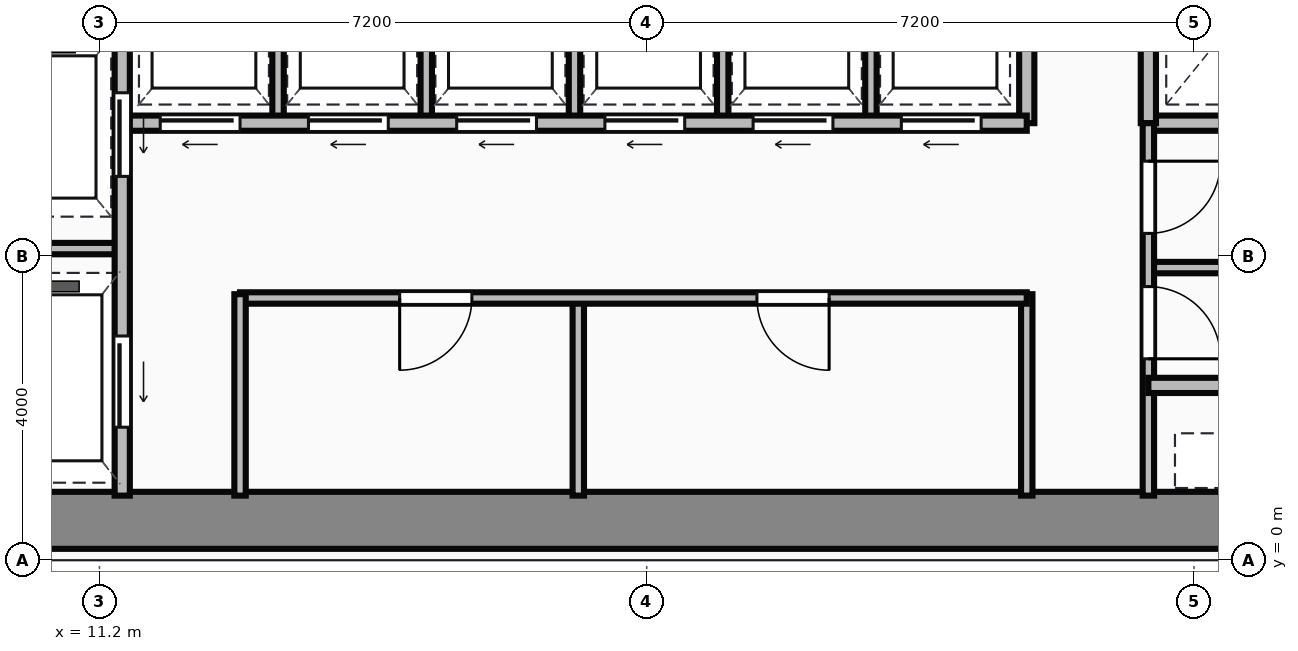
"""IFC4 building model, lengths in metres.
Left out: names, types, materials, properties, quantities, classifications, styles, units other than length and angle.
Written with IfcOpenShell. Run it as: python <this file> out.ifc"""

import sys

from ifc_helpers import new_model, si_unit, direction, frame, frame_2d, origin, place, context, subcontext, project, spatial, rectangle, extrude, source, transform, mapped, element, fill, save


model = new_model("IFC4")
c1 = context("Model", 3, precision=1e-05, world=origin(), true_north=direction((0.0, 1.0)))
c2 = subcontext(c1, "Body", "Model", "MODEL_VIEW")
j1 = project(units=[si_unit("LENGTHUNIT", "METRE"), si_unit("PLANEANGLEUNIT", "RADIAN")], contexts=[c1])
p1 = place(None, origin())
s1 = spatial("IfcSite", under=j1, at=p1, CompositionType="ELEMENT")
p2 = place(p1, origin())
s2 = spatial("IfcBuilding", under=s1, at=p2, CompositionType="ELEMENT")
p3 = place(p2, frame((0.0, 0.0, 173.45)))
s3 = spatial("IfcBuildingStorey", under=s2, at=p3, CompositionType="ELEMENT", Elevation=173.45)
m1 = source(origin(), c2, "Body", "SweptSolid", [
    extrude(rectangle(XDim=29.5, YDim=0.75, at=frame_2d((14.75, 0.0))), origin(), (0.0, 0.0, 1.0), 3.65),
])
p4 = place(p3, frame((4.5, 0.525, 0.0), z_axis=(0.0, 0.0, 1.0), x_axis=(1.0, 0.0, 0.0)))
e1 = element("IfcWall", 1, at=p4, inside=s3, PredefinedType="SHEAR", context=c2, shape_type="MappedRepresentation", body=[
    mapped(m1, transform((0.0, 0.0, 0.0))),
])
m2 = source(origin(), c2, "Body", "SweptSolid", [
    extrude(rectangle(XDim=9.6, YDim=0.2, at=frame_2d((4.8, 0.0))), origin(), (0.0, 0.0, 1.0), 3.4),
])
p5 = place(p3, frame((11.5, 0.85, 0.0), z_axis=(0.0, 0.0, 1.0), x_axis=(0.0, 1.0, 0.0)))
e2 = element("IfcWall", 2, at=p5, inside=s3, PredefinedType="PARTITIONING", context=c2, shape_type="MappedRepresentation", body=[
    mapped(m2, transform((0.0, 0.0, 0.0))),
])
p6 = place(p5, frame((4.2, 0.0, 0.0)))
e3 = element("IfcOpeningElement", 3, at=p6, cuts=e2, PredefinedType="OPENING", context=c2, shape_type="SweptSolid", body=[
    extrude(rectangle(XDim=1.1, YDim=2.15, at=frame_2d((0.55, 1.075))), frame((0.0, 0.11, 0.0), z_axis=(0.0, -1.0, 0.0), x_axis=(1.0, 0.0, 0.0)), (0.0, 0.0, 1.0), 0.22),
])
p7 = place(p5, frame((0.9, 0.0, 0.0)))
e4 = element("IfcOpeningElement", 4, at=p7, cuts=e2, PredefinedType="OPENING", context=c2, shape_type="SweptSolid", body=[
    extrude(rectangle(XDim=1.2, YDim=2.15, at=frame_2d((0.6, 1.075))), frame((0.0, 0.11, 0.0), z_axis=(0.0, -1.0, 0.0), x_axis=(1.0, 0.0, 0.0)), (0.0, 0.0, 1.0), 0.22),
])
m3 = source(origin(), c2, "Body", "SweptSolid", [
    extrude(rectangle(XDim=2.4, YDim=0.15, at=frame_2d((1.2, 0.0))), origin(), (0.0, 0.0, 1.0), 3.4),
])
p8 = place(p3, frame((9.1, 4.1, 0.0), z_axis=(0.0, 0.0, 1.0), x_axis=(1.0, 0.0, 0.0)))
e5 = element("IfcWall", 5, at=p8, inside=s3, PredefinedType="PARTITIONING", context=c2, shape_type="MappedRepresentation", body=[
    mapped(m3, transform((0.0, 0.0, 0.0))),
])
m4 = source(origin(), c2, "Body", "SweptSolid", [
    extrude(rectangle(XDim=2.65, YDim=0.15, at=frame_2d((1.325, 0.0))), origin(), (0.0, 0.0, 1.0), 3.4),
])
p9 = place(p3, frame((13.05, 0.85, 0.0), z_axis=(0.0, 0.0, 1.0), x_axis=(0.0, 1.0, 0.0)))
e6 = element("IfcWall", 6, at=p9, inside=s3, PredefinedType="PARTITIONING", context=c2, shape_type="MappedRepresentation", body=[
    mapped(m4, transform((0.0, 0.0, 0.0))),
])
m5 = source(origin(), c2, "Body", "SweptSolid", [
    extrude(rectangle(XDim=10.35, YDim=0.15, at=frame_2d((5.175, 0.0))), origin(), (0.0, 0.0, 1.0), 3.4),
])
p10 = place(p3, frame((13.05, 3.45, 0.0), z_axis=(0.0, 0.0, 1.0), x_axis=(1.0, 0.0, 0.0)))
e7 = element("IfcWall", 7, at=p10, inside=s3, PredefinedType="PARTITIONING", context=c2, shape_type="MappedRepresentation", body=[
    mapped(m5, transform((0.0, 0.0, 0.0))),
])
p11 = place(p10, frame((2.1, 0.0, 0.0)))
e8 = element("IfcOpeningElement", 8, at=p11, cuts=e7, PredefinedType="OPENING", context=c2, shape_type="SweptSolid", body=[
    extrude(rectangle(XDim=0.95, YDim=2.15, at=frame_2d((0.475, 1.075))), frame((0.0, 0.085, 0.0), z_axis=(0.0, -1.0, 0.0), x_axis=(1.0, 0.0, 0.0)), (0.0, 0.0, 1.0), 0.17),
])
p12 = place(p10, frame((6.8, 0.0, 0.0)))
e9 = element("IfcOpeningElement", 9, at=p12, cuts=e7, PredefinedType="OPENING", context=c2, shape_type="SweptSolid", body=[
    extrude(rectangle(XDim=0.95, YDim=2.15, at=frame_2d((0.475, 1.075))), frame((0.0, 0.085, 0.0), z_axis=(0.0, -1.0, 0.0), x_axis=(1.0, 0.0, 0.0)), (0.0, 0.0, 1.0), 0.17),
])
p13 = place(p3, frame((23.4, 0.85, 0.0), z_axis=(0.0, 0.0, 1.0), x_axis=(0.0, 1.0, 0.0)))
e10 = element("IfcWall", 10, at=p13, inside=s3, PredefinedType="PARTITIONING", context=c2, shape_type="MappedRepresentation", body=[
    mapped(m4, transform((0.0, 0.0, 0.0))),
])
m6 = source(origin(), c2, "Body", "SweptSolid", [
    extrude(rectangle(XDim=2.6, YDim=0.15, at=frame_2d((1.3, 0.0))), origin(), (0.0, 0.0, 1.0), 3.4),
])
p14 = place(p3, frame((17.5, 0.85, 0.0), z_axis=(0.0, 0.0, 1.0), x_axis=(0.0, 1.0, 0.0)))
e11 = element("IfcWall", 11, at=p14, inside=s3, PredefinedType="PARTITIONING", context=c2, shape_type="MappedRepresentation", body=[
    mapped(m6, transform((0.0, 0.0, 0.0))),
])
m7 = source(origin(), c2, "Body", "SweptSolid", [
    extrude(rectangle(XDim=11.85, YDim=0.2, at=frame_2d((5.925, 0.0))), origin(), (0.0, 0.0, 1.0), 3.4),
])
p15 = place(p3, frame((11.55, 5.75, 0.0), z_axis=(0.0, 0.0, 1.0), x_axis=(1.0, 0.0, 0.0)))
e12 = element("IfcWall", 12, at=p15, inside=s3, PredefinedType="PARTITIONING", context=c2, shape_type="MappedRepresentation", body=[
    mapped(m7, transform((0.0, 0.0, 0.0))),
])
p16 = place(p15, frame((0.45, 0.0, 0.0)))
e13 = element("IfcOpeningElement", 13, at=p16, cuts=e12, PredefinedType="OPENING", context=c2, shape_type="SweptSolid", body=[
    extrude(rectangle(XDim=1.05, YDim=2.15, at=frame_2d((0.525, 1.075))), frame((0.0, 0.11, 0.0), z_axis=(0.0, -1.0, 0.0), x_axis=(1.0, 0.0, 0.0)), (0.0, 0.0, 1.0), 0.22),
])
p17 = place(p15, frame((2.4, 0.0, 0.0)))
e14 = element("IfcOpeningElement", 14, at=p17, cuts=e12, PredefinedType="OPENING", context=c2, shape_type="SweptSolid", body=[
    extrude(rectangle(XDim=1.05, YDim=2.15, at=frame_2d((0.525, 1.075))), frame((0.0, 0.11, 0.0), z_axis=(0.0, -1.0, 0.0), x_axis=(1.0, 0.0, 0.0)), (0.0, 0.0, 1.0), 0.22),
])
p18 = place(p15, frame((4.35, 0.0, 0.0)))
e15 = element("IfcOpeningElement", 15, at=p18, cuts=e12, PredefinedType="OPENING", context=c2, shape_type="SweptSolid", body=[
    extrude(rectangle(XDim=1.05, YDim=2.15, at=frame_2d((0.525, 1.075))), frame((0.0, 0.11, 0.0), z_axis=(0.0, -1.0, 0.0), x_axis=(1.0, 0.0, 0.0)), (0.0, 0.0, 1.0), 0.22),
])
p19 = place(p15, frame((6.3, 0.0, 0.0)))
e16 = element("IfcOpeningElement", 16, at=p19, cuts=e12, PredefinedType="OPENING", context=c2, shape_type="SweptSolid", body=[
    extrude(rectangle(XDim=1.05, YDim=2.15, at=frame_2d((0.525, 1.075))), frame((0.0, 0.11, 0.0), z_axis=(0.0, -1.0, 0.0), x_axis=(1.0, 0.0, 0.0)), (0.0, 0.0, 1.0), 0.22),
])
p20 = place(p15, frame((8.25, 0.0, 0.0)))
e17 = element("IfcOpeningElement", 17, at=p20, cuts=e12, PredefinedType="OPENING", context=c2, shape_type="SweptSolid", body=[
    extrude(rectangle(XDim=1.05, YDim=2.15, at=frame_2d((0.525, 1.075))), frame((0.0, 0.11, 0.0), z_axis=(0.0, -1.0, 0.0), x_axis=(1.0, 0.0, 0.0)), (0.0, 0.0, 1.0), 0.22),
])
p21 = place(p15, frame((10.2, 0.0, 0.0)))
e18 = element("IfcOpeningElement", 18, at=p21, cuts=e12, PredefinedType="OPENING", context=c2, shape_type="SweptSolid", body=[
    extrude(rectangle(XDim=1.05, YDim=2.15, at=frame_2d((0.525, 1.075))), frame((0.0, 0.11, 0.0), z_axis=(0.0, -1.0, 0.0), x_axis=(1.0, 0.0, 0.0)), (0.0, 0.0, 1.0), 0.22),
])
m8 = source(origin(), c2, "Body", "SweptSolid", [
    extrude(rectangle(XDim=2.6, YDim=0.2, at=frame_2d((1.3, 0.0))), origin(), (0.0, 0.0, 1.0), 3.4),
])
p22 = place(p3, frame((23.4, 5.75, 0.0), z_axis=(0.0, 0.0, 1.0), x_axis=(0.0, 1.0, 0.0)))
e19 = element("IfcWall", 19, at=p22, inside=s3, PredefinedType="PARTITIONING", context=c2, shape_type="MappedRepresentation", body=[
    mapped(m8, transform((0.0, 0.0, 0.0))),
])
m9 = source(origin(), c2, "Body", "SweptSolid", [
    extrude(rectangle(XDim=2.5, YDim=0.15, at=frame_2d((1.25, 0.0))), origin(), (0.0, 0.0, 1.0), 3.4),
])
for number, where, z_axis, x_axis in (
    (20, (13.55, 5.8, 0.0), (0.0, 0.0, 1.0), (0.0, 1.0, 0.0)),
    (21, (15.5, 5.8, 0.0), (0.0, 0.0, 1.0), (0.0, 1.0, 0.0)),
    (22, (17.45, 5.8, 0.0), (0.0, 0.0, 1.0), (0.0, 1.0, 0.0)),
    (23, (19.4, 5.8, 0.0), (0.0, 0.0, 1.0), (0.0, 1.0, 0.0)),
    (24, (21.35, 5.8, 0.0), (0.0, 0.0, 1.0), (0.0, 1.0, 0.0)),
):
    element("IfcWall", number, at=place(p3, frame(where, z_axis=z_axis, x_axis=x_axis)), inside=s3, PredefinedType="PARTITIONING", context=c2, shape_type="MappedRepresentation", body=[
        mapped(m9, transform((0.0, 0.0, 0.0))),
    ])
m10 = source(origin(), c2, "Body", "SweptSolid", [
    extrude(rectangle(XDim=4.55, YDim=0.2, at=frame_2d((2.275, 0.0))), origin(), (0.0, 0.0, 1.0), 3.4),
])
p23 = place(p3, frame((25.0, 5.75, 0.0), z_axis=(0.0, 0.0, 1.0), x_axis=(1.0, 0.0, 0.0)))
e25 = element("IfcWall", 25, at=p23, inside=s3, PredefinedType="PARTITIONING", context=c2, shape_type="MappedRepresentation", body=[
    mapped(m10, transform((0.0, 0.0, 0.0))),
])
p24 = place(p3, frame((25.0, 5.75, 0.0), z_axis=(0.0, 0.0, 1.0), x_axis=(0.0, 1.0, 0.0)))
e26 = element("IfcWall", 26, at=p24, inside=s3, PredefinedType="PARTITIONING", context=c2, shape_type="MappedRepresentation", body=[
    mapped(m8, transform((0.0, 0.0, 0.0))),
])
m11 = source(origin(), c2, "Body", "SweptSolid", [
    extrude(rectangle(XDim=4.9, YDim=0.15, at=frame_2d((2.45, 0.0))), origin(), (0.0, 0.0, 1.0), 3.4),
])
p25 = place(p3, frame((25.0, 0.85, 0.0), z_axis=(0.0, 0.0, 1.0), x_axis=(0.0, 1.0, 0.0)))
e27 = element("IfcWall", 27, at=p25, inside=s3, PredefinedType="PARTITIONING", context=c2, shape_type="MappedRepresentation", body=[
    mapped(m11, transform((0.0, 0.0, 0.0))),
])
p26 = place(p25, frame((1.8, 0.0, 0.0)))
e28 = element("IfcOpeningElement", 28, at=p26, cuts=e27, PredefinedType="OPENING", context=c2, shape_type="SweptSolid", body=[
    extrude(rectangle(XDim=0.95, YDim=2.15, at=frame_2d((0.475, 1.075))), frame((0.0, 0.085, 0.0), z_axis=(0.0, -1.0, 0.0), x_axis=(1.0, 0.0, 0.0)), (0.0, 0.0, 1.0), 0.17),
])
p27 = place(p25, frame((3.45, 0.0, 0.0)))
e29 = element("IfcOpeningElement", 29, at=p27, cuts=e27, PredefinedType="OPENING", context=c2, shape_type="SweptSolid", body=[
    extrude(rectangle(XDim=0.95, YDim=2.15, at=frame_2d((0.475, 1.075))), frame((0.0, 0.085, 0.0), z_axis=(0.0, -1.0, 0.0), x_axis=(1.0, 0.0, 0.0)), (0.0, 0.0, 1.0), 0.17),
])
m12 = source(origin(), c2, "Body", "SweptSolid", [
    extrude(rectangle(XDim=2.4, YDim=0.2, at=frame_2d((1.2, 0.0))), origin(), (0.0, 0.0, 1.0), 3.4),
])
p28 = place(p3, frame((25.0, 2.3, 0.0), z_axis=(0.0, 0.0, 1.0), x_axis=(1.0, 0.0, 0.0)))
e30 = element("IfcWall", 30, at=p28, inside=s3, PredefinedType="PARTITIONING", context=c2, shape_type="MappedRepresentation", body=[
    mapped(m12, transform((0.0, 0.0, 0.0))),
])
m13 = source(origin(), c2, "Body", "SweptSolid", [
    extrude(rectangle(XDim=4.55, YDim=0.15, at=frame_2d((2.275, 0.0))), origin(), (0.0, 0.0, 1.0), 3.4),
])
p29 = place(p3, frame((25.0, 3.85, 0.0), z_axis=(0.0, 0.0, 1.0), x_axis=(1.0, 0.0, 0.0)))
e31 = element("IfcWall", 31, at=p29, inside=s3, PredefinedType="PARTITIONING", context=c2, shape_type="MappedRepresentation", body=[
    mapped(m13, transform((0.0, 0.0, 0.0))),
])
m14 = source(origin(), c2, "Body", "SweptSolid", [
    extrude(rectangle(XDim=1.1, YDim=2.15, at=frame_2d((0.55, 1.075))), frame((0.0, 0.025, 0.0), z_axis=(0.0, -1.0, 0.0), x_axis=(1.0, 0.0, 0.0)), (0.0, 0.0, 1.0), 0.05),
])
p30 = place(p6, frame((1.1, 0.0, 0.0), z_axis=(0.0, 0.0, 1.0), x_axis=(-1.0, 0.0, 0.0)))
e32 = element("IfcDoor", 32, at=p30, inside=s3, OperationType="SLIDING_TO_LEFT", PredefinedType="DOOR", context=c2, shape_type="MappedRepresentation", body=[
    mapped(m14, transform((0.0, 0.0, 0.0))),
])
fill(e3, e32)
m15 = source(origin(), c2, "Body", "SweptSolid", [
    extrude(rectangle(XDim=1.2, YDim=2.15, at=frame_2d((0.6, 1.075))), frame((0.0, 0.025, 0.0), z_axis=(0.0, -1.0, 0.0), x_axis=(1.0, 0.0, 0.0)), (0.0, 0.0, 1.0), 0.05),
])
p31 = place(p7, frame((1.2, 0.0, 0.0), z_axis=(0.0, 0.0, 1.0), x_axis=(-1.0, 0.0, 0.0)))
e33 = element("IfcDoor", 33, at=p31, inside=s3, OperationType="SLIDING_TO_LEFT", PredefinedType="DOOR", context=c2, shape_type="MappedRepresentation", body=[
    mapped(m15, transform((0.0, 0.0, 0.0))),
])
fill(e4, e33)
m16 = source(origin(), c2, "Body", "SweptSolid", [
    extrude(rectangle(XDim=0.95, YDim=2.15, at=frame_2d((0.475, 1.075))), frame((0.0, 0.025, 0.0), z_axis=(0.0, -1.0, 0.0), x_axis=(1.0, 0.0, 0.0)), (0.0, 0.0, 1.0), 0.05),
])
p32 = place(p11, origin())
e34 = element("IfcDoor", 34, at=p32, inside=s3, OperationType="SINGLE_SWING_LEFT", PredefinedType="DOOR", context=c2, shape_type="MappedRepresentation", body=[
    mapped(m16, transform((0.0, 0.0, 0.0))),
])
fill(e8, e34)
p33 = place(p12, origin())
e35 = element("IfcDoor", 35, at=p33, inside=s3, OperationType="SINGLE_SWING_RIGHT", PredefinedType="DOOR", context=c2, shape_type="MappedRepresentation", body=[
    mapped(m16, transform((0.0, 0.0, 0.0))),
])
fill(e9, e35)
m17 = source(origin(), c2, "Body", "SweptSolid", [
    extrude(rectangle(XDim=1.05, YDim=2.15, at=frame_2d((0.525, 1.075))), frame((0.0, 0.025, 0.0), z_axis=(0.0, -1.0, 0.0), x_axis=(1.0, 0.0, 0.0)), (0.0, 0.0, 1.0), 0.05),
])
p34 = place(p16, frame((1.05, 0.0, 0.0), z_axis=(0.0, 0.0, 1.0), x_axis=(-1.0, 0.0, 0.0)))
e36 = element("IfcDoor", 36, at=p34, inside=s3, OperationType="SLIDING_TO_LEFT", PredefinedType="DOOR", context=c2, shape_type="MappedRepresentation", body=[
    mapped(m17, transform((0.0, 0.0, 0.0))),
])
fill(e13, e36)
p35 = place(p17, frame((1.05, 0.0, 0.0), z_axis=(0.0, 0.0, 1.0), x_axis=(-1.0, 0.0, 0.0)))
e37 = element("IfcDoor", 37, at=p35, inside=s3, OperationType="SLIDING_TO_LEFT", PredefinedType="DOOR", context=c2, shape_type="MappedRepresentation", body=[
    mapped(m17, transform((0.0, 0.0, 0.0))),
])
fill(e14, e37)
p36 = place(p18, frame((1.05, 0.0, 0.0), z_axis=(0.0, 0.0, 1.0), x_axis=(-1.0, 0.0, 0.0)))
e38 = element("IfcDoor", 38, at=p36, inside=s3, OperationType="SLIDING_TO_LEFT", PredefinedType="DOOR", context=c2, shape_type="MappedRepresentation", body=[
    mapped(m17, transform((0.0, 0.0, 0.0))),
])
fill(e15, e38)
p37 = place(p19, frame((1.05, 0.0, 0.0), z_axis=(0.0, 0.0, 1.0), x_axis=(-1.0, 0.0, 0.0)))
e39 = element("IfcDoor", 39, at=p37, inside=s3, OperationType="SLIDING_TO_LEFT", PredefinedType="DOOR", context=c2, shape_type="MappedRepresentation", body=[
    mapped(m17, transform((0.0, 0.0, 0.0))),
])
fill(e16, e39)
p38 = place(p20, frame((1.05, 0.0, 0.0), z_axis=(0.0, 0.0, 1.0), x_axis=(-1.0, 0.0, 0.0)))
e40 = element("IfcDoor", 40, at=p38, inside=s3, OperationType="SLIDING_TO_LEFT", PredefinedType="DOOR", context=c2, shape_type="MappedRepresentation", body=[
    mapped(m17, transform((0.0, 0.0, 0.0))),
])
fill(e17, e40)
p39 = place(p21, frame((1.05, 0.0, 0.0), z_axis=(0.0, 0.0, 1.0), x_axis=(-1.0, 0.0, 0.0)))
e41 = element("IfcDoor", 41, at=p39, inside=s3, OperationType="SLIDING_TO_LEFT", PredefinedType="DOOR", context=c2, shape_type="MappedRepresentation", body=[
    mapped(m17, transform((0.0, 0.0, 0.0))),
])
fill(e18, e41)
p40 = place(p26, origin())
e42 = element("IfcDoor", 42, at=p40, inside=s3, OperationType="SINGLE_SWING_LEFT", PredefinedType="DOOR", context=c2, shape_type="MappedRepresentation", body=[
    mapped(m16, transform((0.0, 0.0, 0.0))),
])
fill(e28, e42)
p41 = place(p27, origin())
e43 = element("IfcDoor", 43, at=p41, inside=s3, OperationType="SINGLE_SWING_RIGHT", PredefinedType="DOOR", context=c2, shape_type="MappedRepresentation", body=[
    mapped(m16, transform((0.0, 0.0, 0.0))),
])
fill(e29, e43)
save(model, sys.argv[1])
